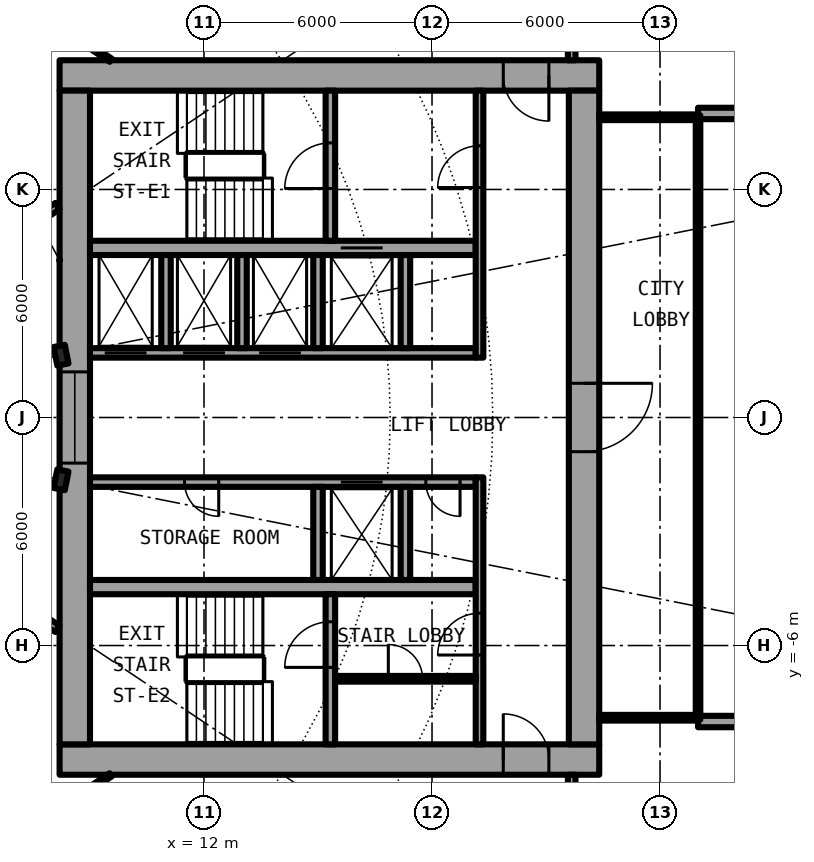
"""IFC4 building model, lengths in metres.
Left out: names, types, materials, properties, quantities, classifications, styles, units other than length and angle.
Written with IfcOpenShell. Run it as: python <this file> out.ifc"""

import sys

from ifc_helpers import new_model, si_unit, direction, frame, frame_2d, origin, origin_2d, place, context, subcontext, project, spatial, rectangle, i_section, extrude, element, fill, save


model = new_model("IFC4")
c1 = context("Model", 3, precision=1e-05, world=origin(), true_north=direction((0.0, 1.0)))
c2 = subcontext(c1, "Body", "Model", "MODEL_VIEW")
j1 = project(units=[si_unit("LENGTHUNIT", "METRE"), si_unit("PLANEANGLEUNIT", "RADIAN")], contexts=[c1])
p1 = place(None, origin())
s1 = spatial("IfcSite", under=j1, at=p1, CompositionType="ELEMENT")
p2 = place(p1, origin())
s2 = spatial("IfcBuilding", under=s1, at=p2, CompositionType="ELEMENT")
p3 = place(p2, frame((0.0, 0.0, 22.8)))
s3 = spatial("IfcBuildingStorey", under=s2, at=p3, CompositionType="ELEMENT", Elevation=22.8)
for number, where, z_axis, x_axis in (
    (1, (8.239, 1.639, 0.0), (0.0, 0.0, 1.0), (0.981, 0.195, 0.0)),
    (2, (8.239, -1.639, 0.0), (0.0, 0.0, 1.0), (0.981, -0.195, 0.0)),
):
    element("IfcColumn", number, at=place(p3, frame(where, z_axis=z_axis, x_axis=x_axis)), inside=s3, PredefinedType="COLUMN", context=c2, shape_type="SweptSolid", body=[
        extrude(i_section(OverallWidth=0.3, OverallDepth=0.5, WebThickness=0.014, FlangeThickness=0.028, FilletRadius=0.027, at=origin_2d()), origin(), (0.0, 0.0, 1.0), 3.05),
    ])
for number, where, z_axis, x_axis in (
    (3, (25.0, 8.0, 0.0), (0.0, 0.0, 1.0), (1.0, 0.0, 0.0)),
    (4, (25.0, -8.0, 0.0), (0.0, 0.0, 1.0), (1.0, 0.0, 0.0)),
):
    element("IfcWall", number, at=place(p3, frame(where, z_axis=z_axis, x_axis=x_axis)), inside=s3, PredefinedType="SOLIDWALL", context=c2, shape_type="SweptSolid", body=[
        extrude(rectangle(XDim=2.667, YDim=0.3, at=frame_2d((1.333, 0.0))), origin(), (0.0, 0.0, 1.0), 2.7),
    ])
p4 = place(p3, frame((22.4, 9.0, 0.0), z_axis=(0.0, 0.0, 1.0), x_axis=(-1.0, 0.0, 0.0)))
e5 = element("IfcWall", 5, at=p4, inside=s3, PredefinedType="SHEAR", context=c2, shape_type="SweptSolid", body=[
    extrude(rectangle(XDim=14.2, YDim=0.8, at=frame_2d((7.1, 0.0))), origin(), (0.0, 0.0, 1.0), 3.05),
])
p5 = place(p4, frame((1.325, 0.0, 0.0)))
e6 = element("IfcOpeningElement", 6, at=p5, cuts=e5, PredefinedType="OPENING", context=c2, shape_type="SweptSolid", body=[
    extrude(rectangle(XDim=1.2, YDim=2.3, at=frame_2d((0.6, 1.15))), frame((0.0, 0.41, 0.0), z_axis=(0.0, -1.0, 0.0), x_axis=(1.0, 0.0, 0.0)), (0.0, 0.0, 1.0), 0.82),
])
p6 = place(p3, frame((8.2, -9.0, 0.0), z_axis=(0.0, 0.0, 1.0), x_axis=(1.0, 0.0, 0.0)))
e7 = element("IfcWall", 7, at=p6, inside=s3, PredefinedType="SHEAR", context=c2, shape_type="SweptSolid", body=[
    extrude(rectangle(XDim=14.2, YDim=0.8, at=frame_2d((7.1, 0.0))), origin(), (0.0, 0.0, 1.0), 3.05),
])
p7 = place(p6, frame((11.675, 0.0, 0.0)))
e8 = element("IfcOpeningElement", 8, at=p7, cuts=e7, PredefinedType="OPENING", context=c2, shape_type="SweptSolid", body=[
    extrude(rectangle(XDim=1.2, YDim=2.3, at=frame_2d((0.6, 1.15))), frame((0.0, 0.41, 0.0), z_axis=(0.0, -1.0, 0.0), x_axis=(1.0, 0.0, 0.0)), (0.0, 0.0, 1.0), 0.82),
])
p8 = place(p3, frame((22.0, 8.6, 0.0), z_axis=(0.0, 0.0, 1.0), x_axis=(0.0, -1.0, 0.0)))
e9 = element("IfcWall", 9, at=p8, inside=s3, PredefinedType="SHEAR", context=c2, shape_type="SweptSolid", body=[
    extrude(rectangle(XDim=17.2, YDim=0.8, at=frame_2d((8.6, 0.0))), origin(), (0.0, 0.0, 1.0), 3.05),
])
p9 = place(p8, frame((7.7, 0.0, 0.0)))
e10 = element("IfcOpeningElement", 10, at=p9, cuts=e9, PredefinedType="OPENING", context=c2, shape_type="SweptSolid", body=[
    extrude(rectangle(XDim=1.8, YDim=2.3, at=frame_2d((0.9, 1.15))), frame((0.0, 0.41, 0.0), z_axis=(0.0, -1.0, 0.0), x_axis=(1.0, 0.0, 0.0)), (0.0, 0.0, 1.0), 0.82),
])
p10 = place(p3, frame((8.6, -8.6, 0.0), z_axis=(0.0, 0.0, 1.0), x_axis=(0.0, 1.0, 0.0)))
e11 = element("IfcWall", 11, at=p10, inside=s3, PredefinedType="SHEAR", context=c2, shape_type="SweptSolid", body=[
    extrude(rectangle(XDim=17.2, YDim=0.8, at=frame_2d((8.6, 0.0))), origin(), (0.0, 0.0, 1.0), 3.05),
])
p11 = place(p10, frame((7.4, 0.0, 0.1)))
e12 = element("IfcOpeningElement", 12, at=p11, cuts=e11, PredefinedType="OPENING", context=c2, shape_type="SweptSolid", body=[
    extrude(rectangle(XDim=2.4, YDim=2.2, at=frame_2d((1.2, 1.1))), frame((0.0, 0.41, 0.0), z_axis=(0.0, -1.0, 0.0), x_axis=(1.0, 0.0, 0.0)), (0.0, 0.0, 1.0), 0.82),
])
p12 = place(p3, frame((9.0, 1.7, 0.0), z_axis=(0.0, 0.0, 1.0), x_axis=(1.0, 0.0, 0.0)))
e13 = element("IfcWall", 13, at=p12, inside=s3, PredefinedType="SHEAR", context=c2, shape_type="SweptSolid", body=[
    extrude(rectangle(XDim=10.15, YDim=0.25, at=frame_2d((5.075, 0.0))), origin(), (0.0, 0.0, 1.0), 3.05),
])
p13 = place(p12, frame((0.387, 0.0, 0.0)))
e14 = element("IfcOpeningElement", 14, at=p13, cuts=e13, PredefinedType="OPENING", context=c2, shape_type="SweptSolid", body=[
    extrude(rectangle(XDim=1.1, YDim=2.3, at=frame_2d((0.55, 1.15))), frame((0.0, 0.135, 0.0), z_axis=(0.0, -1.0, 0.0), x_axis=(1.0, 0.0, 0.0)), (0.0, 0.0, 1.0), 0.27),
])
p14 = place(p12, frame((2.45, 0.0, 0.0)))
e15 = element("IfcOpeningElement", 15, at=p14, cuts=e13, PredefinedType="OPENING", context=c2, shape_type="SweptSolid", body=[
    extrude(rectangle(XDim=1.1, YDim=2.3, at=frame_2d((0.55, 1.15))), frame((0.0, 0.135, 0.0), z_axis=(0.0, -1.0, 0.0), x_axis=(1.0, 0.0, 0.0)), (0.0, 0.0, 1.0), 0.27),
])
p15 = place(p12, frame((4.45, 0.0, 0.0)))
e16 = element("IfcOpeningElement", 16, at=p15, cuts=e13, PredefinedType="OPENING", context=c2, shape_type="SweptSolid", body=[
    extrude(rectangle(XDim=1.1, YDim=2.3, at=frame_2d((0.55, 1.15))), frame((0.0, 0.135, 0.0), z_axis=(0.0, -1.0, 0.0), x_axis=(1.0, 0.0, 0.0)), (0.0, 0.0, 1.0), 0.27),
])
p16 = place(p3, frame((9.0, 4.462, 0.0), z_axis=(0.0, 0.0, 1.0), x_axis=(1.0, 0.0, 0.0)))
e17 = element("IfcWall", 17, at=p16, inside=s3, PredefinedType="SHEAR", context=c2, shape_type="SweptSolid", body=[
    extrude(rectangle(XDim=10.15, YDim=0.375, at=frame_2d((5.075, 0.0))), origin(), (0.0, 0.0, 1.0), 3.05),
])
p17 = place(p16, frame((6.6, 0.0, 0.0)))
e18 = element("IfcOpeningElement", 18, at=p17, cuts=e17, PredefinedType="OPENING", context=c2, shape_type="SweptSolid", body=[
    extrude(rectangle(XDim=1.1, YDim=2.3, at=frame_2d((0.55, 1.15))), frame((0.0, 0.198, 0.0), z_axis=(0.0, -1.0, 0.0), x_axis=(1.0, 0.0, 0.0)), (0.0, 0.0, 1.0), 0.395),
])
p18 = place(p3, frame((15.325, 4.65, 0.0), z_axis=(0.0, 0.0, 1.0), x_axis=(0.0, 1.0, 0.0)))
e19 = element("IfcWall", 19, at=p18, inside=s3, PredefinedType="SHEAR", context=c2, shape_type="SweptSolid", body=[
    extrude(rectangle(XDim=3.95, YDim=0.25, at=frame_2d((1.975, 0.0))), origin(), (0.0, 0.0, 1.0), 3.05),
])
p19 = place(p18, frame((1.375, 0.0, 0.0)))
e20 = element("IfcOpeningElement", 20, at=p19, cuts=e19, PredefinedType="OPENING", context=c2, shape_type="SweptSolid", body=[
    extrude(rectangle(XDim=1.2, YDim=2.3, at=frame_2d((0.6, 1.15))), frame((0.0, 0.135, 0.0), z_axis=(0.0, -1.0, 0.0), x_axis=(1.0, 0.0, 0.0)), (0.0, 0.0, 1.0), 0.27),
])
for number, where, z_axis, x_axis in (
    (21, (15.0, 1.825, 0.0), (0.0, 0.0, 1.0), (0.0, 1.0, 0.0)),
    (22, (17.3, 1.825, 0.0), (0.0, 0.0, 1.0), (0.0, 1.0, 0.0)),
):
    element("IfcWall", number, at=place(p3, frame(where, z_axis=z_axis, x_axis=x_axis)), inside=s3, PredefinedType="SOLIDWALL", context=c2, shape_type="SweptSolid", body=[
        extrude(rectangle(XDim=2.45, YDim=0.25, at=frame_2d((1.225, 0.0))), origin(), (0.0, 0.0, 1.0), 2.7),
    ])
p20 = place(p3, frame((19.25, 1.575, 0.0), z_axis=(0.0, 0.0, 1.0), x_axis=(0.0, 1.0, 0.0)))
e23 = element("IfcWall", 23, at=p20, inside=s3, PredefinedType="SOLIDWALL", context=c2, shape_type="SweptSolid", body=[
    extrude(rectangle(XDim=7.025, YDim=0.2, at=frame_2d((3.513, 0.0))), origin(), (0.0, 0.0, 1.0), 2.7),
])
p21 = place(p20, frame((4.475, 0.0, 0.0)))
e24 = element("IfcOpeningElement", 24, at=p21, cuts=e23, PredefinedType="OPENING", context=c2, shape_type="SweptSolid", body=[
    extrude(rectangle(XDim=1.1, YDim=2.3, at=frame_2d((0.55, 1.15))), frame((0.0, 0.11, 0.0), z_axis=(0.0, -1.0, 0.0), x_axis=(1.0, 0.0, 0.0)), (0.0, 0.0, 1.0), 0.22),
])
p22 = place(p3, frame((19.15, -1.7, 0.0), z_axis=(0.0, 0.0, 1.0), x_axis=(-1.0, 0.0, 0.0)))
e25 = element("IfcWall", 25, at=p22, inside=s3, PredefinedType="SHEAR", context=c2, shape_type="SweptSolid", body=[
    extrude(rectangle(XDim=10.15, YDim=0.25, at=frame_2d((5.075, 0.0))), origin(), (0.0, 0.0, 1.0), 3.05),
])
p23 = place(p22, frame((2.45, 0.0, 0.0)))
e26 = element("IfcOpeningElement", 26, at=p23, cuts=e25, PredefinedType="OPENING", context=c2, shape_type="SweptSolid", body=[
    extrude(rectangle(XDim=1.1, YDim=2.3, at=frame_2d((0.55, 1.15))), frame((0.0, 0.135, 0.0), z_axis=(0.0, -1.0, 0.0), x_axis=(1.0, 0.0, 0.0)), (0.0, 0.0, 1.0), 0.27),
])
p24 = place(p22, frame((6.762, 0.0, 0.0)))
e27 = element("IfcOpeningElement", 27, at=p24, cuts=e25, PredefinedType="OPENING", context=c2, shape_type="SweptSolid", body=[
    extrude(rectangle(XDim=0.9, YDim=2.3, at=frame_2d((0.45, 1.15))), frame((0.0, 0.135, 0.0), z_axis=(0.0, -1.0, 0.0), x_axis=(1.0, 0.0, 0.0)), (0.0, 0.0, 1.0), 0.27),
])
p25 = place(p22, frame((0.413, 0.0, 0.0)))
e28 = element("IfcOpeningElement", 28, at=p25, cuts=e25, PredefinedType="OPENING", context=c2, shape_type="SweptSolid", body=[
    extrude(rectangle(XDim=0.9, YDim=2.3, at=frame_2d((0.45, 1.15))), frame((0.0, 0.135, 0.0), z_axis=(0.0, -1.0, 0.0), x_axis=(1.0, 0.0, 0.0)), (0.0, 0.0, 1.0), 0.27),
])
p26 = place(p3, frame((9.0, -4.462, 0.0), z_axis=(0.0, 0.0, 1.0), x_axis=(1.0, 0.0, 0.0)))
e29 = element("IfcWall", 29, at=p26, inside=s3, PredefinedType="SHEAR", context=c2, shape_type="SweptSolid", body=[
    extrude(rectangle(XDim=10.15, YDim=0.375, at=frame_2d((5.075, 0.0))), origin(), (0.0, 0.0, 1.0), 3.05),
])
p27 = place(p3, frame((15.325, -8.6, 0.0), z_axis=(0.0, 0.0, 1.0), x_axis=(0.0, 1.0, 0.0)))
e30 = element("IfcWall", 30, at=p27, inside=s3, PredefinedType="SHEAR", context=c2, shape_type="SweptSolid", body=[
    extrude(rectangle(XDim=3.95, YDim=0.25, at=frame_2d((1.975, 0.0))), origin(), (0.0, 0.0, 1.0), 3.05),
])
p28 = place(p27, frame((2.025, 0.0, 0.0)))
e31 = element("IfcOpeningElement", 31, at=p28, cuts=e30, PredefinedType="OPENING", context=c2, shape_type="SweptSolid", body=[
    extrude(rectangle(XDim=1.2, YDim=2.3, at=frame_2d((0.6, 1.15))), frame((0.0, 0.135, 0.0), z_axis=(0.0, -1.0, 0.0), x_axis=(1.0, 0.0, 0.0)), (0.0, 0.0, 1.0), 0.27),
])
for number, where, z_axis, x_axis in (
    (32, (15.0, -1.825, 0.0), (0.0, 0.0, 1.0), (0.0, -1.0, 0.0)),
    (33, (17.3, -1.825, 0.0), (0.0, 0.0, 1.0), (0.0, -1.0, 0.0)),
):
    element("IfcWall", number, at=place(p3, frame(where, z_axis=z_axis, x_axis=x_axis)), inside=s3, PredefinedType="SOLIDWALL", context=c2, shape_type="SweptSolid", body=[
        extrude(rectangle(XDim=2.45, YDim=0.25, at=frame_2d((1.225, 0.0))), origin(), (0.0, 0.0, 1.0), 2.7),
    ])
p29 = place(p3, frame((19.25, -8.6, 0.0), z_axis=(0.0, 0.0, 1.0), x_axis=(0.0, 1.0, 0.0)))
e34 = element("IfcWall", 34, at=p29, inside=s3, PredefinedType="SOLIDWALL", context=c2, shape_type="SweptSolid", body=[
    extrude(rectangle(XDim=7.025, YDim=0.2, at=frame_2d((3.513, 0.0))), origin(), (0.0, 0.0, 1.0), 2.7),
])
p30 = place(p29, frame((2.35, 0.0, 0.0)))
e35 = element("IfcOpeningElement", 35, at=p30, cuts=e34, PredefinedType="OPENING", context=c2, shape_type="SweptSolid", body=[
    extrude(rectangle(XDim=1.1, YDim=2.3, at=frame_2d((0.55, 1.15))), frame((0.0, 0.11, 0.0), z_axis=(0.0, -1.0, 0.0), x_axis=(1.0, 0.0, 0.0)), (0.0, 0.0, 1.0), 0.22),
])
for number, where, z_axis, x_axis in (
    (36, (11.0, 1.825, 0.0), (0.0, 0.0, 1.0), (0.0, 1.0, 0.0)),
    (37, (13.0, 1.825, 0.0), (0.0, 0.0, 1.0), (0.0, 1.0, 0.0)),
):
    element("IfcWall", number, at=place(p3, frame(where, z_axis=z_axis, x_axis=x_axis)), inside=s3, PredefinedType="SOLIDWALL", context=c2, shape_type="SweptSolid", body=[
        extrude(rectangle(XDim=2.45, YDim=0.25, at=frame_2d((1.225, 0.0))), origin(), (0.0, 0.0, 1.0), 2.7),
    ])
p31 = place(p3, frame((15.45, -6.875, 0.0), z_axis=(0.0, 0.0, 1.0), x_axis=(1.0, 0.0, 0.0)))
e38 = element("IfcWall", 38, at=p31, inside=s3, PredefinedType="PARTITIONING", context=c2, shape_type="SweptSolid", body=[
    extrude(rectangle(XDim=3.7, YDim=0.15, at=frame_2d((1.85, 0.0))), origin(), (0.0, 0.0, 1.0), 2.7),
])
p32 = place(p31, frame((1.4, 0.0, 0.0)))
e39 = element("IfcOpeningElement", 39, at=p32, cuts=e38, PredefinedType="OPENING", context=c2, shape_type="SweptSolid", body=[
    extrude(rectangle(XDim=0.9, YDim=2.3, at=frame_2d((0.45, 1.15))), frame((0.0, 0.085, 0.0), z_axis=(0.0, -1.0, 0.0), x_axis=(1.0, 0.0, 0.0)), (0.0, 0.0, 1.0), 0.17),
])
for number, where, z_axis, x_axis in (
    (40, (22.4, -7.9, 0.0), (0.0, 0.0, 1.0), (1.0, 0.0, 0.0)),
    (41, (22.4, 7.9, 0.0), (0.0, 0.0, 1.0), (1.0, 0.0, 0.0)),
):
    element("IfcWall", number, at=place(p3, frame(where, z_axis=z_axis, x_axis=x_axis)), inside=s3, PredefinedType="PARTITIONING", context=c2, shape_type="SweptSolid", body=[
        extrude(rectangle(XDim=2.54, YDim=0.15, at=frame_2d((1.27, 0.0))), origin(), (0.0, 0.0, 1.0), 2.7),
    ])
p33 = place(p3, frame((25.0, -7.95, 0.0), z_axis=(0.0, 0.0, 1.0), x_axis=(0.0, 1.0, 0.0)))
e42 = element("IfcWall", 42, at=p33, inside=s3, PredefinedType="PARTITIONING", context=c2, shape_type="SweptSolid", body=[
    extrude(rectangle(XDim=15.9, YDim=0.12, at=frame_2d((7.95, 0.0))), origin(), (0.0, 0.0, 1.0), 2.7),
])
p34 = place(p33, frame((0.95, 0.0, 0.1)))
e43 = element("IfcOpeningElement", 43, at=p34, cuts=e42, PredefinedType="OPENING", context=c2, shape_type="SweptSolid", body=[
    extrude(rectangle(XDim=14.0, YDim=2.35, at=frame_2d((7.0, 1.175))), frame((0.0, 0.07, 0.0), z_axis=(0.0, -1.0, 0.0), x_axis=(1.0, 0.0, 0.0)), (0.0, 0.0, 1.0), 0.14),
])
for number, where, z_axis, x_axis in (
    (44, (21.675, -11.0, 0.0), (0.0, 0.0, 1.0), (0.0, 1.0, 0.0)),
    (45, (21.675, 9.4, 0.0), (0.0, 0.0, 1.0), (0.0, 1.0, 0.0)),
):
    element("IfcWall", number, at=place(p3, frame(where, z_axis=z_axis, x_axis=x_axis)), inside=s3, PredefinedType="PARTITIONING", context=c2, shape_type="SweptSolid", body=[
        extrude(rectangle(XDim=1.6, YDim=0.2, at=frame_2d((0.8, 0.0))), origin(), (0.0, 0.0, 1.0), 2.7),
    ])
p35 = place(p3, frame((6.158, -11.664, 0.0), z_axis=(0.0, 0.0, 1.0), x_axis=(0.831459707426, 0.555585056429, 0.0)))
e46 = element("IfcWall", 46, at=p35, inside=s3, PredefinedType="PARTITIONING", context=c2, shape_type="SweptSolid", body=[
    extrude(rectangle(XDim=4.073, YDim=0.1, at=frame_2d((2.037, 0.0))), origin(), (0.0, 0.0, 1.0), 2.7),
])
for number, where, z_axis, x_axis in (
    (47, (6.513, -4.472, 0.0), (0.0, 0.0, 1.0), (0.831, -0.556, 0.0)),
    (48, (6.513, 4.472, 0.0), (0.0, 0.0, 1.0), (0.831, 0.556, 0.0)),
):
    element("IfcWall", number, at=place(p3, frame(where, z_axis=z_axis, x_axis=x_axis)), inside=s3, PredefinedType="PARTITIONING", context=c2, shape_type="SweptSolid", body=[
        extrude(rectangle(XDim=1.962, YDim=0.2, at=frame_2d((0.981, 0.0))), origin(), (0.0, 0.0, 1.0), 2.7),
    ])
p36 = place(p3, frame((6.159, 11.663, 0.0), z_axis=(0.0, 0.0, 1.0), x_axis=(0.831459707426, -0.555585056429, 0.0)))
e49 = element("IfcWall", 49, at=p36, inside=s3, PredefinedType="PARTITIONING", context=c2, shape_type="SweptSolid", body=[
    extrude(rectangle(XDim=4.073, YDim=0.1, at=frame_2d((2.037, 0.0))), origin(), (0.0, 0.0, 1.0), 2.7),
])
p37 = place(p13, origin())
e50 = element("IfcDoor", 50, at=p37, inside=s3, OperationType="DOUBLE_DOOR_SLIDING", PredefinedType="DOOR", context=c2, shape_type="SweptSolid", body=[
    extrude(rectangle(XDim=1.1, YDim=2.3, at=frame_2d((0.55, 1.15))), frame((0.0, 0.025, 0.0), z_axis=(0.0, -1.0, 0.0), x_axis=(1.0, 0.0, 0.0)), (0.0, 0.0, 1.0), 0.05),
])
fill(e14, e50)
p38 = place(p14, origin())
e51 = element("IfcDoor", 51, at=p38, inside=s3, OperationType="DOUBLE_DOOR_SLIDING", PredefinedType="DOOR", context=c2, shape_type="SweptSolid", body=[
    extrude(rectangle(XDim=1.1, YDim=2.3, at=frame_2d((0.55, 1.15))), frame((0.0, 0.025, 0.0), z_axis=(0.0, -1.0, 0.0), x_axis=(1.0, 0.0, 0.0)), (0.0, 0.0, 1.0), 0.05),
])
fill(e15, e51)
p39 = place(p15, origin())
e52 = element("IfcDoor", 52, at=p39, inside=s3, OperationType="DOUBLE_DOOR_SLIDING", PredefinedType="DOOR", context=c2, shape_type="SweptSolid", body=[
    extrude(rectangle(XDim=1.1, YDim=2.3, at=frame_2d((0.55, 1.15))), frame((0.0, 0.025, 0.0), z_axis=(0.0, -1.0, 0.0), x_axis=(1.0, 0.0, 0.0)), (0.0, 0.0, 1.0), 0.05),
])
fill(e16, e52)
p40 = place(p17, origin())
e53 = element("IfcDoor", 53, at=p40, inside=s3, OperationType="DOUBLE_DOOR_SLIDING", PredefinedType="DOOR", context=c2, shape_type="SweptSolid", body=[
    extrude(rectangle(XDim=1.1, YDim=2.3, at=frame_2d((0.55, 1.15))), frame((0.0, 0.025, 0.0), z_axis=(0.0, -1.0, 0.0), x_axis=(1.0, 0.0, 0.0)), (0.0, 0.0, 1.0), 0.05),
])
fill(e18, e53)
p41 = place(p23, origin())
e54 = element("IfcDoor", 54, at=p41, inside=s3, OperationType="DOUBLE_DOOR_SLIDING", PredefinedType="DOOR", context=c2, shape_type="SweptSolid", body=[
    extrude(rectangle(XDim=1.1, YDim=2.3, at=frame_2d((0.55, 1.15))), frame((0.0, 0.025, 0.0), z_axis=(0.0, -1.0, 0.0), x_axis=(1.0, 0.0, 0.0)), (0.0, 0.0, 1.0), 0.05),
])
fill(e26, e54)
p42 = place(p24, origin())
e55 = element("IfcDoor", 55, at=p42, inside=s3, OperationType="SINGLE_SWING_LEFT", PredefinedType="DOOR", context=c2, shape_type="SweptSolid", body=[
    extrude(rectangle(XDim=0.9, YDim=2.3, at=frame_2d((0.45, 1.15))), frame((0.0, 0.025, 0.0), z_axis=(0.0, -1.0, 0.0), x_axis=(1.0, 0.0, 0.0)), (0.0, 0.0, 1.0), 0.05),
])
fill(e27, e55)
p43 = place(p25, origin())
e56 = element("IfcDoor", 56, at=p43, inside=s3, OperationType="SINGLE_SWING_RIGHT", PredefinedType="DOOR", context=c2, shape_type="SweptSolid", body=[
    extrude(rectangle(XDim=0.9, YDim=2.3, at=frame_2d((0.45, 1.15))), frame((0.0, 0.025, 0.0), z_axis=(0.0, -1.0, 0.0), x_axis=(1.0, 0.0, 0.0)), (0.0, 0.0, 1.0), 0.05),
])
fill(e28, e56)
p44 = place(p32, origin())
e57 = element("IfcDoor", 57, at=p44, inside=s3, OperationType="SINGLE_SWING_LEFT", PredefinedType="DOOR", context=c2, shape_type="SweptSolid", body=[
    extrude(rectangle(XDim=0.9, YDim=2.3, at=frame_2d((0.45, 1.15))), frame((0.0, 0.025, 0.0), z_axis=(0.0, -1.0, 0.0), x_axis=(1.0, 0.0, 0.0)), (0.0, 0.0, 1.0), 0.05),
])
fill(e39, e57)
p45 = place(p19, origin())
e58 = element("IfcDoor", 58, at=p45, inside=s3, OperationType="SINGLE_SWING_LEFT", PredefinedType="DOOR", context=c2, shape_type="SweptSolid", body=[
    extrude(rectangle(XDim=1.2, YDim=2.3, at=frame_2d((0.6, 1.15))), frame((0.0, 0.025, 0.0), z_axis=(0.0, -1.0, 0.0), x_axis=(1.0, 0.0, 0.0)), (0.0, 0.0, 1.0), 0.05),
])
fill(e20, e58)
p46 = place(p28, origin())
e59 = element("IfcDoor", 59, at=p46, inside=s3, OperationType="SINGLE_SWING_LEFT", PredefinedType="DOOR", context=c2, shape_type="SweptSolid", body=[
    extrude(rectangle(XDim=1.2, YDim=2.3, at=frame_2d((0.6, 1.15))), frame((0.0, 0.025, 0.0), z_axis=(0.0, -1.0, 0.0), x_axis=(1.0, 0.0, 0.0)), (0.0, 0.0, 1.0), 0.05),
])
fill(e31, e59)
p47 = place(p21, origin())
e60 = element("IfcDoor", 60, at=p47, inside=s3, OperationType="SINGLE_SWING_LEFT", PredefinedType="DOOR", context=c2, shape_type="SweptSolid", body=[
    extrude(rectangle(XDim=1.1, YDim=2.3, at=frame_2d((0.55, 1.15))), frame((0.0, 0.025, 0.0), z_axis=(0.0, -1.0, 0.0), x_axis=(1.0, 0.0, 0.0)), (0.0, 0.0, 1.0), 0.05),
])
fill(e24, e60)
p48 = place(p30, origin())
e61 = element("IfcDoor", 61, at=p48, inside=s3, OperationType="SINGLE_SWING_RIGHT", PredefinedType="DOOR", context=c2, shape_type="SweptSolid", body=[
    extrude(rectangle(XDim=1.1, YDim=2.3, at=frame_2d((0.55, 1.15))), frame((0.0, 0.025, 0.0), z_axis=(0.0, -1.0, 0.0), x_axis=(1.0, 0.0, 0.0)), (0.0, 0.0, 1.0), 0.05),
])
fill(e35, e61)
p49 = place(p5, origin())
e62 = element("IfcDoor", 62, at=p49, inside=s3, OperationType="SINGLE_SWING_RIGHT", PredefinedType="DOOR", context=c2, shape_type="SweptSolid", body=[
    extrude(rectangle(XDim=1.2, YDim=2.3, at=frame_2d((0.6, 1.15))), frame((0.0, 0.025, 0.0), z_axis=(0.0, -1.0, 0.0), x_axis=(1.0, 0.0, 0.0)), (0.0, 0.0, 1.0), 0.05),
])
fill(e6, e62)
p50 = place(p7, origin())
e63 = element("IfcDoor", 63, at=p50, inside=s3, OperationType="SINGLE_SWING_LEFT", PredefinedType="DOOR", context=c2, shape_type="SweptSolid", body=[
    extrude(rectangle(XDim=1.2, YDim=2.3, at=frame_2d((0.6, 1.15))), frame((0.0, 0.025, 0.0), z_axis=(0.0, -1.0, 0.0), x_axis=(1.0, 0.0, 0.0)), (0.0, 0.0, 1.0), 0.05),
])
fill(e8, e63)
p51 = place(p9, origin())
e64 = element("IfcDoor", 64, at=p51, inside=s3, OperationType="SINGLE_SWING_LEFT", PredefinedType="DOOR", context=c2, shape_type="SweptSolid", body=[
    extrude(rectangle(XDim=1.8, YDim=2.3, at=frame_2d((0.9, 1.15))), frame((0.0, 0.025, 0.0), z_axis=(0.0, -1.0, 0.0), x_axis=(1.0, 0.0, 0.0)), (0.0, 0.0, 1.0), 0.05),
])
fill(e10, e64)
p52 = place(p11, origin())
e65 = element("IfcWindow", 65, at=p52, inside=s3, PartitioningType="SINGLE_PANEL", PredefinedType="WINDOW", context=c2, shape_type="SweptSolid", body=[
    extrude(rectangle(XDim=2.4, YDim=2.2, at=frame_2d((1.2, 1.1))), frame((0.0, 0.03, 0.0), z_axis=(0.0, -1.0, 0.0), x_axis=(1.0, 0.0, 0.0)), (0.0, 0.0, 1.0), 0.06),
])
fill(e12, e65)
p53 = place(p34, origin())
e66 = element("IfcWindow", 66, at=p53, inside=s3, PartitioningType="SINGLE_PANEL", PredefinedType="WINDOW", context=c2, shape_type="SweptSolid", body=[
    extrude(rectangle(XDim=14.0, YDim=2.35, at=frame_2d((7.0, 1.175))), frame((0.0, 0.03, 0.0), z_axis=(0.0, -1.0, 0.0), x_axis=(1.0, 0.0, 0.0)), (0.0, 0.0, 1.0), 0.06),
])
fill(e43, e66)
save(model, sys.argv[1])
